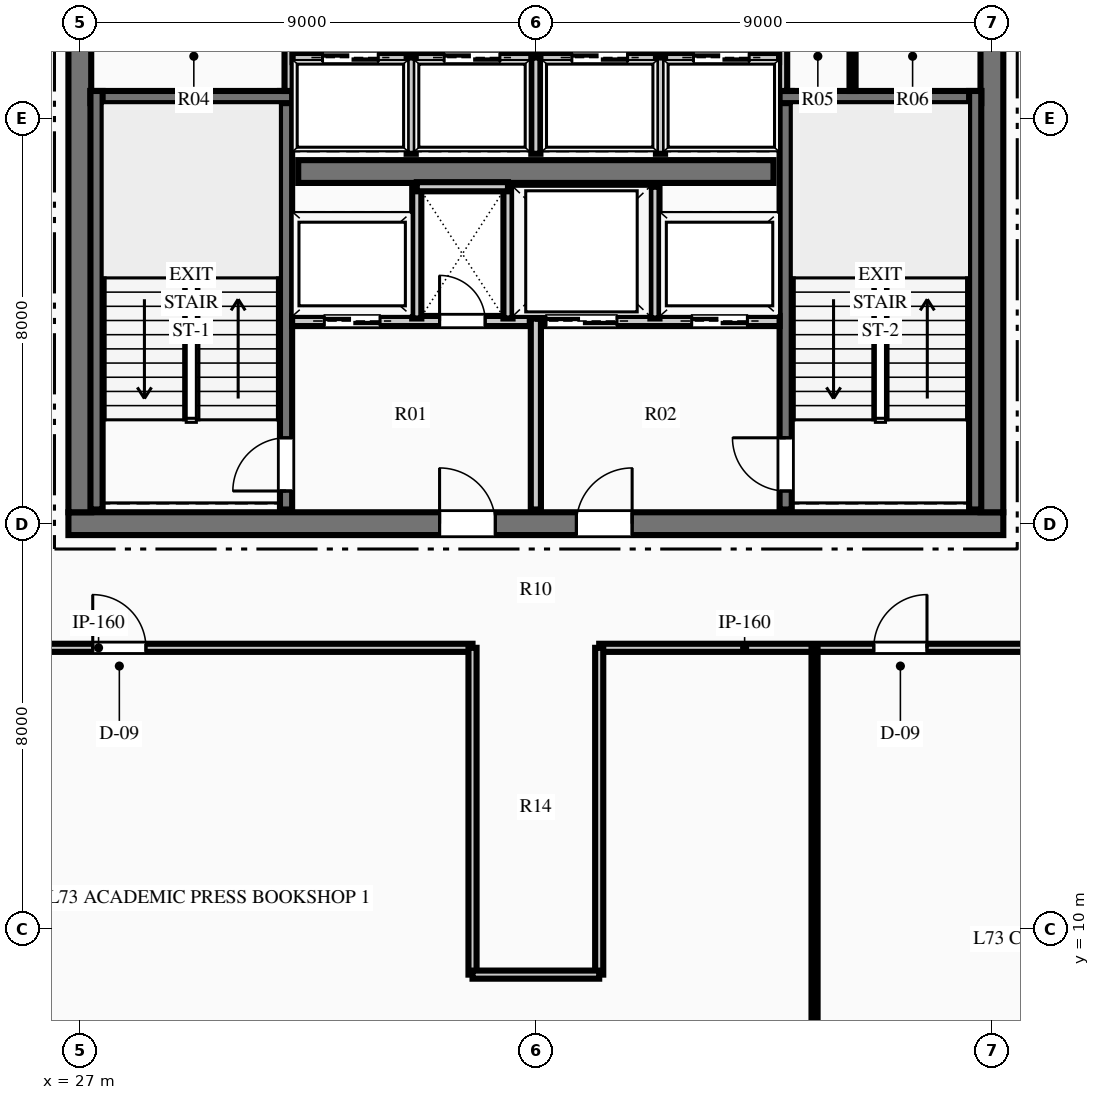
"""IFC4 building model, lengths in metres.
Left out: names, types, materials, properties, quantities, classifications, styles, units other than length and angle.
Written with IfcOpenShell. Run it as: python <this file> out.ifc"""

import sys

from ifc_helpers import new_model, si_unit, direction, frame, frame_2d, origin, place, context, subcontext, project, spatial, rectangle, extrude, element, fill, save


model = new_model("IFC4")
c1 = context("Model", 3, precision=1e-05, world=origin(), true_north=direction((0.0, 1.0)))
c2 = subcontext(c1, "Body", "Model", "MODEL_VIEW")
j1 = project(units=[si_unit("LENGTHUNIT", "METRE"), si_unit("PLANEANGLEUNIT", "RADIAN")], contexts=[c1])
p1 = place(None, origin())
s1 = spatial("IfcSite", under=j1, at=p1, CompositionType="ELEMENT")
p2 = place(p1, origin())
s2 = spatial("IfcBuilding", under=s1, at=p2, CompositionType="ELEMENT")
p3 = place(p2, frame((0.0, 0.0, 289.95)))
s3 = spatial("IfcBuildingStorey", under=s2, at=p3, CompositionType="ELEMENT", Elevation=289.95)
p4 = place(p3, frame((26.775, 18.0, 0.0), z_axis=(0.0, 0.0, 1.0), x_axis=(1.0, 0.0, 0.0)))
e1 = element("IfcWall", 1, at=p4, inside=s3, PredefinedType="SHEAR", context=c2, shape_type="SweptSolid", body=[
    extrude(rectangle(XDim=18.45, YDim=0.45, at=frame_2d((9.225, 0.0))), origin(), (0.0, 0.0, 1.0), 3.75),
])
p5 = place(p4, frame((7.325, 0.0, 0.0)))
e2 = element("IfcOpeningElement", 2, at=p5, cuts=e1, PredefinedType="OPENING", context=c2, shape_type="SweptSolid", body=[
    extrude(rectangle(XDim=1.1, YDim=2.15, at=frame_2d((0.55, 1.075))), frame((0.0, 0.235, 0.0), z_axis=(0.0, -1.0, 0.0), x_axis=(1.0, 0.0, 0.0)), (0.0, 0.0, 1.0), 0.47),
])
p6 = place(p4, frame((10.025, 0.0, 0.0)))
e3 = element("IfcOpeningElement", 3, at=p6, cuts=e1, PredefinedType="OPENING", context=c2, shape_type="SweptSolid", body=[
    extrude(rectangle(XDim=1.1, YDim=2.15, at=frame_2d((0.55, 1.075))), frame((0.0, 0.235, 0.0), z_axis=(0.0, -1.0, 0.0), x_axis=(1.0, 0.0, 0.0)), (0.0, 0.0, 1.0), 0.47),
])
p7 = place(p3, frame((27.0, 18.225, 0.0), z_axis=(0.0, 0.0, 1.0), x_axis=(0.0, 1.0, 0.0)))
e4 = element("IfcWall", 4, at=p7, inside=s3, PredefinedType="SHEAR", context=c2, shape_type="SweptSolid", body=[
    extrude(rectangle(XDim=15.55, YDim=0.45, at=frame_2d((7.775, 0.0))), origin(), (0.0, 0.0, 1.0), 3.75),
])
p8 = place(p7, frame((10.015, 0.0, 0.0)))
e5 = element("IfcOpeningElement", 5, at=p8, cuts=e4, PredefinedType="OPENING", context=c2, shape_type="SweptSolid", body=[
    extrude(rectangle(XDim=1.4, YDim=2.2, at=frame_2d((0.7, 1.1))), frame((0.0, 0.235, 0.0), z_axis=(0.0, -1.0, 0.0), x_axis=(1.0, 0.0, 0.0)), (0.0, 0.0, 1.0), 0.47),
])
p9 = place(p3, frame((45.0, 18.225, 0.0), z_axis=(0.0, 0.0, 1.0), x_axis=(0.0, 1.0, 0.0)))
e6 = element("IfcWall", 6, at=p9, inside=s3, PredefinedType="SHEAR", context=c2, shape_type="SweptSolid", body=[
    extrude(rectangle(XDim=15.55, YDim=0.45, at=frame_2d((7.775, 0.0))), origin(), (0.0, 0.0, 1.0), 3.75),
])
p10 = place(p9, frame((10.015, 0.0, 0.0)))
e7 = element("IfcOpeningElement", 7, at=p10, cuts=e6, PredefinedType="OPENING", context=c2, shape_type="SweptSolid", body=[
    extrude(rectangle(XDim=1.4, YDim=2.2, at=frame_2d((0.7, 1.1))), frame((0.0, 0.235, 0.0), z_axis=(0.0, -1.0, 0.0), x_axis=(1.0, 0.0, 0.0)), (0.0, 0.0, 1.0), 0.47),
])
p11 = place(p3, frame((31.31, 24.95, 0.0), z_axis=(0.0, 0.0, 1.0), x_axis=(1.0, 0.0, 0.0)))
e8 = element("IfcWall", 8, at=p11, inside=s3, PredefinedType="SHEAR", context=c2, shape_type="SweptSolid", body=[
    extrude(rectangle(XDim=9.38, YDim=0.45, at=frame_2d((4.69, 0.0))), origin(), (0.0, 0.0, 1.0), 3.75),
])
p12 = place(p3, frame((31.07, 18.28, 0.0), z_axis=(0.0, 0.0, 1.0), x_axis=(0.0, 1.0, 0.0)))
e9 = element("IfcWall", 9, at=p12, inside=s3, PredefinedType="SHEAR", context=c2, shape_type="SweptSolid", body=[
    extrude(rectangle(XDim=8.26, YDim=0.24, at=frame_2d((4.13, 0.0))), origin(), (0.0, 0.0, 1.0), 3.75),
])
p13 = place(p12, frame((0.365, 0.0, 0.0)))
e10 = element("IfcOpeningElement", 10, at=p13, cuts=e9, PredefinedType="OPENING", context=c2, shape_type="SweptSolid", body=[
    extrude(rectangle(XDim=1.05, YDim=2.15, at=frame_2d((0.525, 1.075))), frame((0.0, 0.13, 0.0), z_axis=(0.0, -1.0, 0.0), x_axis=(1.0, 0.0, 0.0)), (0.0, 0.0, 1.0), 0.26),
])
p14 = place(p3, frame((27.21, 26.42, 0.0), z_axis=(0.0, 0.0, 1.0), x_axis=(1.0, 0.0, 0.0)))
e11 = element("IfcWall", 11, at=p14, inside=s3, PredefinedType="SHEAR", context=c2, shape_type="SweptSolid", body=[
    extrude(rectangle(XDim=3.98, YDim=0.24, at=frame_2d((1.99, 0.0))), origin(), (0.0, 0.0, 1.0), 3.75),
])
p15 = place(p3, frame((27.33, 18.28, 0.0), z_axis=(0.0, 0.0, 1.0), x_axis=(0.0, 1.0, 0.0)))
e12 = element("IfcWall", 12, at=p15, inside=s3, PredefinedType="SHEAR", context=c2, shape_type="SweptSolid", body=[
    extrude(rectangle(XDim=8.26, YDim=0.24, at=frame_2d((4.13, 0.0))), origin(), (0.0, 0.0, 1.0), 3.75),
])
p16 = place(p3, frame((40.93, 18.28, 0.0), z_axis=(0.0, 0.0, 1.0), x_axis=(0.0, 1.0, 0.0)))
e13 = element("IfcWall", 13, at=p16, inside=s3, PredefinedType="SHEAR", context=c2, shape_type="SweptSolid", body=[
    extrude(rectangle(XDim=8.26, YDim=0.24, at=frame_2d((4.13, 0.0))), origin(), (0.0, 0.0, 1.0), 3.75),
])
p17 = place(p16, frame((0.365, 0.0, 0.0)))
e14 = element("IfcOpeningElement", 14, at=p17, cuts=e13, PredefinedType="OPENING", context=c2, shape_type="SweptSolid", body=[
    extrude(rectangle(XDim=1.05, YDim=2.15, at=frame_2d((0.525, 1.075))), frame((0.0, 0.13, 0.0), z_axis=(0.0, -1.0, 0.0), x_axis=(1.0, 0.0, 0.0)), (0.0, 0.0, 1.0), 0.26),
])
p18 = place(p3, frame((40.81, 26.42, 0.0), z_axis=(0.0, 0.0, 1.0), x_axis=(1.0, 0.0, 0.0)))
e15 = element("IfcWall", 15, at=p18, inside=s3, PredefinedType="SHEAR", context=c2, shape_type="SweptSolid", body=[
    extrude(rectangle(XDim=3.98, YDim=0.24, at=frame_2d((1.99, 0.0))), origin(), (0.0, 0.0, 1.0), 3.75),
])
p19 = place(p3, frame((44.67, 18.28, 0.0), z_axis=(0.0, 0.0, 1.0), x_axis=(0.0, 1.0, 0.0)))
e16 = element("IfcWall", 16, at=p19, inside=s3, PredefinedType="SHEAR", context=c2, shape_type="SweptSolid", body=[
    extrude(rectangle(XDim=8.26, YDim=0.24, at=frame_2d((4.13, 0.0))), origin(), (0.0, 0.0, 1.0), 3.75),
])
p20 = place(p3, frame((36.0, 18.28, 0.0), z_axis=(0.0, 0.0, 1.0), x_axis=(0.0, 1.0, 0.0)))
e17 = element("IfcWall", 17, at=p20, inside=s3, PredefinedType="PARTITIONING", context=c2, shape_type="SweptSolid", body=[
    extrude(rectangle(XDim=3.77, YDim=0.2, at=frame_2d((1.885, 0.0))), origin(), (0.0, 0.0, 1.0), 3.34),
])
p21 = place(p3, frame((31.19, 22.0, 0.0), z_axis=(0.0, 0.0, 1.0), x_axis=(1.0, 0.0, 0.0)))
e18 = element("IfcWall", 18, at=p21, inside=s3, PredefinedType="PARTITIONING", context=c2, shape_type="SweptSolid", body=[
    extrude(rectangle(XDim=4.69, YDim=0.2, at=frame_2d((2.345, 0.0))), origin(), (0.0, 0.0, 1.0), 3.34),
])
p22 = place(p21, frame((2.91, 0.0, 0.0)))
e19 = element("IfcOpeningElement", 19, at=p22, cuts=e18, PredefinedType="OPENING", context=c2, shape_type="SweptSolid", body=[
    extrude(rectangle(XDim=0.9, YDim=2.15, at=frame_2d((0.45, 1.075))), frame((0.0, 0.11, 0.0), z_axis=(0.0, -1.0, 0.0), x_axis=(1.0, 0.0, 0.0)), (0.0, 0.0, 1.0), 0.22),
])
p23 = place(p21, frame((0.635, 0.0, 0.0)))
e20 = element("IfcOpeningElement", 20, at=p23, cuts=e18, PredefinedType="OPENING", context=c2, shape_type="SweptSolid", body=[
    extrude(rectangle(XDim=1.1, YDim=2.15, at=frame_2d((0.55, 1.075))), frame((0.0, 0.11, 0.0), z_axis=(0.0, -1.0, 0.0), x_axis=(1.0, 0.0, 0.0)), (0.0, 0.0, 1.0), 0.22),
])
p24 = place(p3, frame((36.12, 22.0, 0.0), z_axis=(0.0, 0.0, 1.0), x_axis=(1.0, 0.0, 0.0)))
e21 = element("IfcWall", 21, at=p24, inside=s3, PredefinedType="PARTITIONING", context=c2, shape_type="SweptSolid", body=[
    extrude(rectangle(XDim=4.69, YDim=0.2, at=frame_2d((2.345, 0.0))), origin(), (0.0, 0.0, 1.0), 3.34),
])
p25 = place(p24, frame((2.955, 0.0, 0.0)))
e22 = element("IfcOpeningElement", 22, at=p25, cuts=e21, PredefinedType="OPENING", context=c2, shape_type="SweptSolid", body=[
    extrude(rectangle(XDim=1.1, YDim=2.15, at=frame_2d((0.55, 1.075))), frame((0.0, 0.11, 0.0), z_axis=(0.0, -1.0, 0.0), x_axis=(1.0, 0.0, 0.0)), (0.0, 0.0, 1.0), 0.22),
])
p26 = place(p24, frame((0.08, 0.0, 0.0)))
e23 = element("IfcOpeningElement", 23, at=p26, cuts=e21, PredefinedType="OPENING", context=c2, shape_type="SweptSolid", body=[
    extrude(rectangle(XDim=1.4, YDim=2.2, at=frame_2d((0.7, 1.1))), frame((0.0, 0.11, 0.0), z_axis=(0.0, -1.0, 0.0), x_axis=(1.0, 0.0, 0.0)), (0.0, 0.0, 1.0), 0.22),
])
for number, where, z_axis, x_axis in (
    (24, (33.65, 22.05, 0.0), (0.0, 0.0, 1.0), (0.0, 1.0, 0.0)),
    (25, (35.45, 22.05, 0.0), (0.0, 0.0, 1.0), (0.0, 1.0, 0.0)),
):
    element("IfcWall", number, at=place(p3, frame(where, z_axis=z_axis, x_axis=x_axis)), inside=s3, PredefinedType="PARTITIONING", context=c2, shape_type="SweptSolid", body=[
        extrude(rectangle(XDim=2.6, YDim=0.18, at=frame_2d((1.3, 0.0))), origin(), (0.0, 0.0, 1.0), 3.34),
    ])
p27 = place(p3, frame((33.65, 24.65, 0.0), z_axis=(0.0, 0.0, 1.0), x_axis=(1.0, 0.0, 0.0)))
e26 = element("IfcWall", 26, at=p27, inside=s3, PredefinedType="PARTITIONING", context=c2, shape_type="SweptSolid", body=[
    extrude(rectangle(XDim=1.8, YDim=0.18, at=frame_2d((0.9, 0.0))), origin(), (0.0, 0.0, 1.0), 3.34),
])
p28 = place(p3, frame((38.35, 22.05, 0.0), z_axis=(0.0, 0.0, 1.0), x_axis=(0.0, 1.0, 0.0)))
e27 = element("IfcWall", 27, at=p28, inside=s3, PredefinedType="PARTITIONING", context=c2, shape_type="SweptSolid", body=[
    extrude(rectangle(XDim=2.6, YDim=0.18, at=frame_2d((1.3, 0.0))), origin(), (0.0, 0.0, 1.0), 3.34),
])
for number, where, z_axis, x_axis in (
    (28, (31.12, 26.54, 0.0), (0.0, 0.0, 1.0), (0.0, 1.0, 0.0)),
    (29, (40.88, 26.54, 0.0), (0.0, 0.0, 1.0), (0.0, 1.0, 0.0)),
):
    element("IfcWall", number, at=place(p3, frame(where, z_axis=z_axis, x_axis=x_axis)), inside=s3, PredefinedType="PARTITIONING", context=c2, shape_type="SweptSolid", body=[
        extrude(rectangle(XDim=1.51, YDim=0.16, at=frame_2d((0.755, 0.0))), origin(), (0.0, 0.0, 1.0), 3.34),
    ])
p29 = place(p3, frame((42.25, 26.54, 0.0), z_axis=(0.0, 0.0, 1.0), x_axis=(0.0, 1.0, 0.0)))
e30 = element("IfcWall", 30, at=p29, inside=s3, PredefinedType="PARTITIONING", context=c2, shape_type="SweptSolid", body=[
    extrude(rectangle(XDim=1.44, YDim=0.12, at=frame_2d((0.72, 0.0))), origin(), (0.0, 0.0, 1.0), 3.34),
])
p30 = place(p3, frame((31.2, 27.2, 0.0), z_axis=(0.0, 0.0, 1.0), x_axis=(1.0, 0.0, 0.0)))
e31 = element("IfcWall", 31, at=p30, inside=s3, PredefinedType="PARTITIONING", context=c2, shape_type="SweptSolid", body=[
    extrude(rectangle(XDim=9.6, YDim=0.18, at=frame_2d((4.8, 0.0))), origin(), (0.0, 0.0, 1.0), 3.34),
])
p31 = place(p30, frame((0.59, 0.0, 0.0)))
e32 = element("IfcOpeningElement", 32, at=p31, cuts=e31, PredefinedType="OPENING", context=c2, shape_type="SweptSolid", body=[
    extrude(rectangle(XDim=1.1, YDim=2.15, at=frame_2d((0.55, 1.075))), frame((0.0, 0.1, 0.0), z_axis=(0.0, -1.0, 0.0), x_axis=(1.0, 0.0, 0.0)), (0.0, 0.0, 1.0), 0.2),
])
p32 = place(p30, frame((2.99, 0.0, 0.0)))
e33 = element("IfcOpeningElement", 33, at=p32, cuts=e31, PredefinedType="OPENING", context=c2, shape_type="SweptSolid", body=[
    extrude(rectangle(XDim=1.1, YDim=2.15, at=frame_2d((0.55, 1.075))), frame((0.0, 0.1, 0.0), z_axis=(0.0, -1.0, 0.0), x_axis=(1.0, 0.0, 0.0)), (0.0, 0.0, 1.0), 0.2),
])
p33 = place(p30, frame((5.51, 0.0, 0.0)))
e34 = element("IfcOpeningElement", 34, at=p33, cuts=e31, PredefinedType="OPENING", context=c2, shape_type="SweptSolid", body=[
    extrude(rectangle(XDim=1.1, YDim=2.15, at=frame_2d((0.55, 1.075))), frame((0.0, 0.1, 0.0), z_axis=(0.0, -1.0, 0.0), x_axis=(1.0, 0.0, 0.0)), (0.0, 0.0, 1.0), 0.2),
])
p34 = place(p30, frame((7.91, 0.0, 0.0)))
e35 = element("IfcOpeningElement", 35, at=p34, cuts=e31, PredefinedType="OPENING", context=c2, shape_type="SweptSolid", body=[
    extrude(rectangle(XDim=1.1, YDim=2.15, at=frame_2d((0.55, 1.075))), frame((0.0, 0.1, 0.0), z_axis=(0.0, -1.0, 0.0), x_axis=(1.0, 0.0, 0.0)), (0.0, 0.0, 1.0), 0.2),
])
for number, where, z_axis, x_axis in (
    (36, (33.54, 25.3, 0.0), (0.0, 0.0, 1.0), (0.0, 1.0, 0.0)),
    (37, (36.0, 25.3, 0.0), (0.0, 0.0, 1.0), (0.0, 1.0, 0.0)),
    (38, (38.46, 25.3, 0.0), (0.0, 0.0, 1.0), (0.0, 1.0, 0.0)),
):
    element("IfcWall", number, at=place(p3, frame(where, z_axis=z_axis, x_axis=x_axis)), inside=s3, PredefinedType="PARTITIONING", context=c2, shape_type="SweptSolid", body=[
        extrude(rectangle(XDim=1.9, YDim=0.18, at=frame_2d((0.95, 0.0))), origin(), (0.0, 0.0, 1.0), 3.34),
    ])
p35 = place(p3, frame((24.5, 15.55, 0.0), z_axis=(0.0, 0.0, 1.0), x_axis=(1.0, 0.0, 0.0)))
e39 = element("IfcWall", 39, at=p35, inside=s3, PredefinedType="PARTITIONING", context=c2, shape_type="SweptSolid", body=[
    extrude(rectangle(XDim=10.25, YDim=0.16, at=frame_2d((5.125, 0.0))), origin(), (0.0, 0.0, 1.0), 3.34),
])
p36 = place(p35, frame((2.755, 0.0, 0.0)))
e40 = element("IfcOpeningElement", 40, at=p36, cuts=e39, PredefinedType="OPENING", context=c2, shape_type="SweptSolid", body=[
    extrude(rectangle(XDim=1.05, YDim=2.15, at=frame_2d((0.525, 1.075))), frame((0.0, 0.09, 0.0), z_axis=(0.0, -1.0, 0.0), x_axis=(1.0, 0.0, 0.0)), (0.0, 0.0, 1.0), 0.18),
])
p37 = place(p3, frame((37.25, 15.55, 0.0), z_axis=(0.0, 0.0, 1.0), x_axis=(1.0, 0.0, 0.0)))
e41 = element("IfcWall", 41, at=p37, inside=s3, PredefinedType="PARTITIONING", context=c2, shape_type="SweptSolid", body=[
    extrude(rectangle(XDim=10.25, YDim=0.16, at=frame_2d((5.125, 0.0))), origin(), (0.0, 0.0, 1.0), 3.34),
])
p38 = place(p37, frame((5.419, 0.0, 0.0)))
e42 = element("IfcOpeningElement", 42, at=p38, cuts=e41, PredefinedType="OPENING", context=c2, shape_type="SweptSolid", body=[
    extrude(rectangle(XDim=1.05, YDim=2.15, at=frame_2d((0.525, 1.075))), frame((0.0, 0.09, 0.0), z_axis=(0.0, -1.0, 0.0), x_axis=(1.0, 0.0, 0.0)), (0.0, 0.0, 1.0), 0.18),
])
for number, where, z_axis, x_axis in (
    (43, (34.75, 9.1, 0.0), (0.0, 0.0, 1.0), (0.0, 1.0, 0.0)),
    (44, (37.25, 9.1, 0.0), (0.0, 0.0, 1.0), (0.0, 1.0, 0.0)),
):
    element("IfcWall", number, at=place(p3, frame(where, z_axis=z_axis, x_axis=x_axis)), inside=s3, PredefinedType="PARTITIONING", context=c2, shape_type="SweptSolid", body=[
        extrude(rectangle(XDim=6.45, YDim=0.16, at=frame_2d((3.225, 0.0))), origin(), (0.0, 0.0, 1.0), 3.34),
    ])
p39 = place(p3, frame((34.75, 9.1, 0.0), z_axis=(0.0, 0.0, 1.0), x_axis=(1.0, 0.0, 0.0)))
e45 = element("IfcWall", 45, at=p39, inside=s3, PredefinedType="PARTITIONING", context=c2, shape_type="SweptSolid", body=[
    extrude(rectangle(XDim=2.5, YDim=0.16, at=frame_2d((1.25, 0.0))), origin(), (0.0, 0.0, 1.0), 3.34),
])
p40 = place(p3, frame((41.5, 1.344, 0.0), z_axis=(0.0, 0.0, 1.0), x_axis=(0.0, 1.0, 0.0)))
e46 = element("IfcWall", 46, at=p40, inside=s3, PredefinedType="PARTITIONING", context=c2, shape_type="SweptSolid", body=[
    extrude(rectangle(XDim=14.206, YDim=0.12, at=frame_2d((7.103, 0.0))), origin(), (0.0, 0.0, 1.0), 3.34),
])
p41 = place(p13, origin())
e47 = element("IfcDoor", 47, at=p41, inside=s3, OperationType="SINGLE_SWING_LEFT", PredefinedType="DOOR", context=c2, shape_type="SweptSolid", body=[
    extrude(rectangle(XDim=1.05, YDim=2.15, at=frame_2d((0.525, 1.075))), frame((0.0, 0.025, 0.0), z_axis=(0.0, -1.0, 0.0), x_axis=(1.0, 0.0, 0.0)), (0.0, 0.0, 1.0), 0.05),
])
fill(e10, e47)
p42 = place(p17, origin())
e48 = element("IfcDoor", 48, at=p42, inside=s3, OperationType="SINGLE_SWING_RIGHT", PredefinedType="DOOR", context=c2, shape_type="SweptSolid", body=[
    extrude(rectangle(XDim=1.05, YDim=2.15, at=frame_2d((0.525, 1.075))), frame((0.0, 0.025, 0.0), z_axis=(0.0, -1.0, 0.0), x_axis=(1.0, 0.0, 0.0)), (0.0, 0.0, 1.0), 0.05),
])
fill(e14, e48)
p43 = place(p5, origin())
e49 = element("IfcDoor", 49, at=p43, inside=s3, OperationType="SINGLE_SWING_LEFT", PredefinedType="DOOR", context=c2, shape_type="SweptSolid", body=[
    extrude(rectangle(XDim=1.1, YDim=2.15, at=frame_2d((0.55, 1.075))), frame((0.0, 0.025, 0.0), z_axis=(0.0, -1.0, 0.0), x_axis=(1.0, 0.0, 0.0)), (0.0, 0.0, 1.0), 0.05),
])
fill(e2, e49)
p44 = place(p6, origin())
e50 = element("IfcDoor", 50, at=p44, inside=s3, OperationType="SINGLE_SWING_RIGHT", PredefinedType="DOOR", context=c2, shape_type="SweptSolid", body=[
    extrude(rectangle(XDim=1.1, YDim=2.15, at=frame_2d((0.55, 1.075))), frame((0.0, 0.025, 0.0), z_axis=(0.0, -1.0, 0.0), x_axis=(1.0, 0.0, 0.0)), (0.0, 0.0, 1.0), 0.05),
])
fill(e3, e50)
p45 = place(p22, origin())
e51 = element("IfcDoor", 51, at=p45, inside=s3, OperationType="SINGLE_SWING_LEFT", PredefinedType="DOOR", context=c2, shape_type="SweptSolid", body=[
    extrude(rectangle(XDim=0.9, YDim=2.15, at=frame_2d((0.45, 1.075))), frame((0.0, 0.025, 0.0), z_axis=(0.0, -1.0, 0.0), x_axis=(1.0, 0.0, 0.0)), (0.0, 0.0, 1.0), 0.05),
])
fill(e19, e51)
p46 = place(p36, origin())
e52 = element("IfcDoor", 52, at=p46, inside=s3, OperationType="SINGLE_SWING_LEFT", PredefinedType="DOOR", context=c2, shape_type="SweptSolid", body=[
    extrude(rectangle(XDim=1.05, YDim=2.15, at=frame_2d((0.525, 1.075))), frame((0.0, 0.025, 0.0), z_axis=(0.0, -1.0, 0.0), x_axis=(1.0, 0.0, 0.0)), (0.0, 0.0, 1.0), 0.05),
])
fill(e40, e52)
p47 = place(p38, origin())
e53 = element("IfcDoor", 53, at=p47, inside=s3, OperationType="SINGLE_SWING_RIGHT", PredefinedType="DOOR", context=c2, shape_type="SweptSolid", body=[
    extrude(rectangle(XDim=1.05, YDim=2.15, at=frame_2d((0.525, 1.075))), frame((0.0, 0.025, 0.0), z_axis=(0.0, -1.0, 0.0), x_axis=(1.0, 0.0, 0.0)), (0.0, 0.0, 1.0), 0.05),
])
fill(e42, e53)
p48 = place(p31, origin())
e54 = element("IfcDoor", 54, at=p48, inside=s3, OperationType="SLIDING_TO_LEFT", PredefinedType="DOOR", context=c2, shape_type="SweptSolid", body=[
    extrude(rectangle(XDim=1.1, YDim=2.15, at=frame_2d((0.55, 1.075))), frame((0.0, 0.025, 0.0), z_axis=(0.0, -1.0, 0.0), x_axis=(1.0, 0.0, 0.0)), (0.0, 0.0, 1.0), 0.05),
])
fill(e32, e54)
p49 = place(p32, origin())
e55 = element("IfcDoor", 55, at=p49, inside=s3, OperationType="SLIDING_TO_LEFT", PredefinedType="DOOR", context=c2, shape_type="SweptSolid", body=[
    extrude(rectangle(XDim=1.1, YDim=2.15, at=frame_2d((0.55, 1.075))), frame((0.0, 0.025, 0.0), z_axis=(0.0, -1.0, 0.0), x_axis=(1.0, 0.0, 0.0)), (0.0, 0.0, 1.0), 0.05),
])
fill(e33, e55)
p50 = place(p33, origin())
e56 = element("IfcDoor", 56, at=p50, inside=s3, OperationType="SLIDING_TO_LEFT", PredefinedType="DOOR", context=c2, shape_type="SweptSolid", body=[
    extrude(rectangle(XDim=1.1, YDim=2.15, at=frame_2d((0.55, 1.075))), frame((0.0, 0.025, 0.0), z_axis=(0.0, -1.0, 0.0), x_axis=(1.0, 0.0, 0.0)), (0.0, 0.0, 1.0), 0.05),
])
fill(e34, e56)
p51 = place(p34, origin())
e57 = element("IfcDoor", 57, at=p51, inside=s3, OperationType="SLIDING_TO_LEFT", PredefinedType="DOOR", context=c2, shape_type="SweptSolid", body=[
    extrude(rectangle(XDim=1.1, YDim=2.15, at=frame_2d((0.55, 1.075))), frame((0.0, 0.025, 0.0), z_axis=(0.0, -1.0, 0.0), x_axis=(1.0, 0.0, 0.0)), (0.0, 0.0, 1.0), 0.05),
])
fill(e35, e57)
p52 = place(p23, origin())
e58 = element("IfcDoor", 58, at=p52, inside=s3, OperationType="SLIDING_TO_LEFT", PredefinedType="DOOR", context=c2, shape_type="SweptSolid", body=[
    extrude(rectangle(XDim=1.1, YDim=2.15, at=frame_2d((0.55, 1.075))), frame((0.0, 0.025, 0.0), z_axis=(0.0, -1.0, 0.0), x_axis=(1.0, 0.0, 0.0)), (0.0, 0.0, 1.0), 0.05),
])
fill(e20, e58)
p53 = place(p25, origin())
e59 = element("IfcDoor", 59, at=p53, inside=s3, OperationType="SLIDING_TO_LEFT", PredefinedType="DOOR", context=c2, shape_type="SweptSolid", body=[
    extrude(rectangle(XDim=1.1, YDim=2.15, at=frame_2d((0.55, 1.075))), frame((0.0, 0.025, 0.0), z_axis=(0.0, -1.0, 0.0), x_axis=(1.0, 0.0, 0.0)), (0.0, 0.0, 1.0), 0.05),
])
fill(e22, e59)
p54 = place(p26, origin())
e60 = element("IfcDoor", 60, at=p54, inside=s3, OperationType="SLIDING_TO_LEFT", PredefinedType="DOOR", context=c2, shape_type="SweptSolid", body=[
    extrude(rectangle(XDim=1.4, YDim=2.2, at=frame_2d((0.7, 1.1))), frame((0.0, 0.025, 0.0), z_axis=(0.0, -1.0, 0.0), x_axis=(1.0, 0.0, 0.0)), (0.0, 0.0, 1.0), 0.05),
])
fill(e23, e60)
save(model, sys.argv[1])
